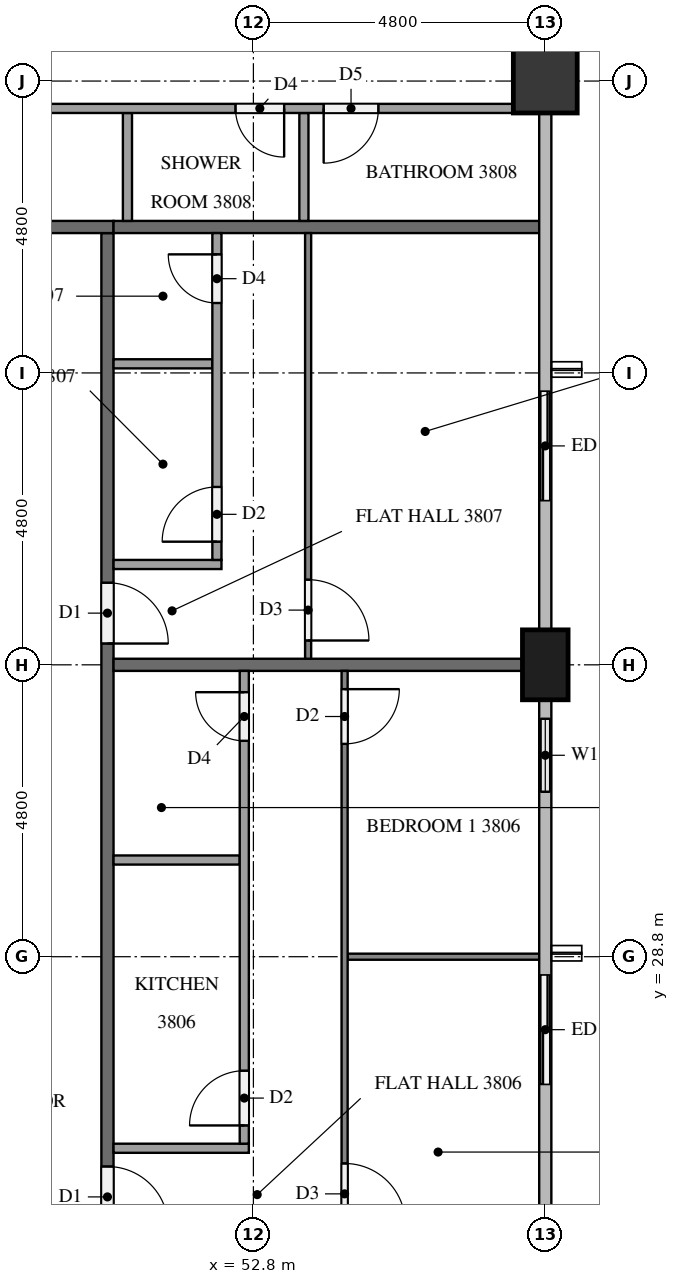
"""IFC4 building model, lengths in metres.
Left out: names, types, materials, properties, quantities, classifications, styles, units other than length and angle.
Written with IfcOpenShell. Run it as: python <this file> out.ifc"""

import sys

from ifc_helpers import new_model, si_unit, direction, frame, frame_2d, origin, origin_2d, place, context, subcontext, project, spatial, rectangle, extrude, element, fill, save


model = new_model("IFC4")
c1 = context("Model", 3, precision=1e-05, world=origin(), true_north=direction((0.0, 1.0)))
c2 = subcontext(c1, "Body", "Model", "MODEL_VIEW")
j1 = project(units=[si_unit("LENGTHUNIT", "METRE"), si_unit("PLANEANGLEUNIT", "RADIAN")], contexts=[c1])
p1 = place(None, origin())
s1 = spatial("IfcSite", under=j1, at=p1, CompositionType="ELEMENT")
p2 = place(p1, origin())
s2 = spatial("IfcBuilding", under=s1, at=p2, CompositionType="ELEMENT")
p3 = place(p2, frame((0.0, 0.0, 149.0)))
s3 = spatial("IfcBuildingStorey", under=s2, at=p3, CompositionType="ELEMENT", Elevation=149.0)
p4 = place(p3, frame((57.6, 33.6, 0.0), z_axis=(0.0, 0.0, 1.0), x_axis=(0.0, 1.0, 0.0)))
e1 = element("IfcColumn", 1, at=p4, inside=s3, PredefinedType="COLUMN", context=c2, shape_type="SweptSolid", body=[
    extrude(rectangle(XDim=1.15, YDim=0.75, at=origin_2d()), origin(), (0.0, 0.0, 1.0), 3.2),
])
p5 = place(p3, frame((57.6, 43.2, 0.0), z_axis=(0.0, 0.0, 1.0), x_axis=(1.0, 0.0, 0.0)))
e2 = element("IfcColumn", 2, at=p5, inside=s3, PredefinedType="COLUMN", context=c2, shape_type="SweptSolid", body=[
    extrude(rectangle(XDim=1.05, YDim=1.05, at=origin_2d()), origin(), (0.0, 0.0, 1.0), 3.2),
])
p6 = place(p3, frame((57.6, 26.4, 0.0), z_axis=(0.0, 0.0, 1.0), x_axis=(0.0, 1.0, 0.0)))
e3 = element("IfcWall", 3, at=p6, inside=s3, PredefinedType="SOLIDWALL", context=c2, shape_type="SweptSolid", body=[
    extrude(rectangle(XDim=2.4, YDim=0.15, at=frame_2d((1.2, 0.0))), origin(), (0.0, 0.0, 1.0), 3.2),
])
p7 = place(p6, frame((0.3, 0.0, 0.0)))
e4 = element("IfcOpeningElement", 4, at=p7, cuts=e3, PredefinedType="OPENING", context=c2, shape_type="SweptSolid", body=[
    extrude(rectangle(XDim=1.8, YDim=2.4, at=frame_2d((0.9, 1.2))), frame((0.0, 0.085, 0.0), z_axis=(0.0, -1.0, 0.0), x_axis=(1.0, 0.0, 0.0)), (0.0, 0.0, 1.0), 0.17),
])
p8 = place(p3, frame((57.6, 31.2, 0.0), z_axis=(0.0, 0.0, 1.0), x_axis=(0.0, 1.0, 0.0)))
e5 = element("IfcWall", 5, at=p8, inside=s3, PredefinedType="SOLIDWALL", context=c2, shape_type="SweptSolid", body=[
    extrude(rectangle(XDim=1.825, YDim=0.15, at=frame_2d((0.913, 0.0))), origin(), (0.0, 0.0, 1.0), 3.2),
])
p9 = place(p8, frame((0.312, 0.0, 0.9)))
e6 = element("IfcOpeningElement", 6, at=p9, cuts=e5, PredefinedType="OPENING", context=c2, shape_type="SweptSolid", body=[
    extrude(rectangle(XDim=1.2, YDim=1.4, at=frame_2d((0.6, 0.7))), frame((0.0, 0.085, 0.0), z_axis=(0.0, -1.0, 0.0), x_axis=(1.0, 0.0, 0.0)), (0.0, 0.0, 1.0), 0.17),
])
p10 = place(p3, frame((57.6, 36.0, 0.0), z_axis=(0.0, 0.0, 1.0), x_axis=(0.0, 1.0, 0.0)))
e7 = element("IfcWall", 7, at=p10, inside=s3, PredefinedType="SOLIDWALL", context=c2, shape_type="SweptSolid", body=[
    extrude(rectangle(XDim=2.4, YDim=0.15, at=frame_2d((1.2, 0.0))), origin(), (0.0, 0.0, 1.0), 3.2),
])
p11 = place(p10, frame((0.3, 0.0, 0.0)))
e8 = element("IfcOpeningElement", 8, at=p11, cuts=e7, PredefinedType="OPENING", context=c2, shape_type="SweptSolid", body=[
    extrude(rectangle(XDim=1.8, YDim=2.4, at=frame_2d((0.9, 1.2))), frame((0.0, 0.085, 0.0), z_axis=(0.0, -1.0, 0.0), x_axis=(1.0, 0.0, 0.0)), (0.0, 0.0, 1.0), 0.17),
])
p12 = place(p3, frame((50.4, 40.7, 0.0), z_axis=(0.0, 0.0, 1.0), x_axis=(0.0, -1.0, 0.0)))
e9 = element("IfcWall", 9, at=p12, inside=s3, PredefinedType="PARTITIONING", context=c2, shape_type="SweptSolid", body=[
    extrude(rectangle(XDim=28.6, YDim=0.2, at=frame_2d((14.3, 0.0))), origin(), (0.0, 0.0, 1.0), 3.2),
])
p13 = place(p12, frame((17.05, 0.0, 0.0)))
e10 = element("IfcOpeningElement", 10, at=p13, cuts=e9, PredefinedType="OPENING", context=c2, shape_type="SweptSolid", body=[
    extrude(rectangle(XDim=1.0, YDim=2.1, at=frame_2d((0.5, 1.05))), frame((0.0, 0.11, 0.0), z_axis=(0.0, -1.0, 0.0), x_axis=(1.0, 0.0, 0.0)), (0.0, 0.0, 1.0), 0.22),
])
p14 = place(p12, frame((15.35, 0.0, 0.0)))
e11 = element("IfcOpeningElement", 11, at=p14, cuts=e9, PredefinedType="OPENING", context=c2, shape_type="SweptSolid", body=[
    extrude(rectangle(XDim=1.0, YDim=2.1, at=frame_2d((0.5, 1.05))), frame((0.0, 0.11, 0.0), z_axis=(0.0, -1.0, 0.0), x_axis=(1.0, 0.0, 0.0)), (0.0, 0.0, 1.0), 0.22),
])
p15 = place(p12, frame((5.75, 0.0, 0.0)))
e12 = element("IfcOpeningElement", 12, at=p15, cuts=e9, PredefinedType="OPENING", context=c2, shape_type="SweptSolid", body=[
    extrude(rectangle(XDim=1.0, YDim=2.1, at=frame_2d((0.5, 1.05))), frame((0.0, 0.11, 0.0), z_axis=(0.0, -1.0, 0.0), x_axis=(1.0, 0.0, 0.0)), (0.0, 0.0, 1.0), 0.22),
])
p16 = place(p3, frame((11.9, 40.8, 0.0), z_axis=(0.0, 0.0, 1.0), x_axis=(1.0, 0.0, 0.0)))
e13 = element("IfcWall", 13, at=p16, inside=s3, PredefinedType="PARTITIONING", context=c2, shape_type="SweptSolid", body=[
    extrude(rectangle(XDim=38.6, YDim=0.2, at=frame_2d((19.3, 0.0))), origin(), (0.0, 0.0, 1.0), 3.2),
])
p17 = place(p16, frame((31.65, 0.0, 0.0)))
e14 = element("IfcOpeningElement", 14, at=p17, cuts=e13, PredefinedType="OPENING", context=c2, shape_type="SweptSolid", body=[
    extrude(rectangle(XDim=1.0, YDim=2.1, at=frame_2d((0.5, 1.05))), frame((0.0, 0.11, 0.0), z_axis=(0.0, -1.0, 0.0), x_axis=(1.0, 0.0, 0.0)), (0.0, 0.0, 1.0), 0.22),
])
p18 = place(p16, frame((29.95, 0.0, 0.0)))
e15 = element("IfcOpeningElement", 15, at=p18, cuts=e13, PredefinedType="OPENING", context=c2, shape_type="SweptSolid", body=[
    extrude(rectangle(XDim=1.0, YDim=2.1, at=frame_2d((0.5, 1.05))), frame((0.0, 0.11, 0.0), z_axis=(0.0, -1.0, 0.0), x_axis=(1.0, 0.0, 0.0)), (0.0, 0.0, 1.0), 0.22),
])
p19 = place(p16, frame((15.55, 0.0, 0.0)))
e16 = element("IfcOpeningElement", 16, at=p19, cuts=e13, PredefinedType="OPENING", context=c2, shape_type="SweptSolid", body=[
    extrude(rectangle(XDim=1.0, YDim=2.1, at=frame_2d((0.5, 1.05))), frame((0.0, 0.11, 0.0), z_axis=(0.0, -1.0, 0.0), x_axis=(1.0, 0.0, 0.0)), (0.0, 0.0, 1.0), 0.22),
])
p20 = place(p16, frame((1.15, 0.0, 0.0)))
e17 = element("IfcOpeningElement", 17, at=p20, cuts=e13, PredefinedType="OPENING", context=c2, shape_type="SweptSolid", body=[
    extrude(rectangle(XDim=1.0, YDim=2.1, at=frame_2d((0.5, 1.05))), frame((0.0, 0.11, 0.0), z_axis=(0.0, -1.0, 0.0), x_axis=(1.0, 0.0, 0.0)), (0.0, 0.0, 1.0), 0.22),
])
p21 = place(p3, frame((50.5, 33.6, 0.0), z_axis=(0.0, 0.0, 1.0), x_axis=(1.0, 0.0, 0.0)))
e18 = element("IfcWall", 18, at=p21, inside=s3, PredefinedType="PARTITIONING", context=c2, shape_type="SweptSolid", body=[
    extrude(rectangle(XDim=6.725, YDim=0.2, at=frame_2d((3.363, 0.0))), origin(), (0.0, 0.0, 1.0), 3.2),
])
p22 = place(p3, frame((50.5, 40.8, 0.0), z_axis=(0.0, 0.0, 1.0), x_axis=(1.0, 0.0, 0.0)))
e19 = element("IfcWall", 19, at=p22, inside=s3, PredefinedType="PARTITIONING", context=c2, shape_type="SweptSolid", body=[
    extrude(rectangle(XDim=7.0, YDim=0.2, at=frame_2d((3.5, 0.0))), origin(), (0.0, 0.0, 1.0), 3.2),
])
p23 = place(p3, frame((54.35, 28.8, 0.0), z_axis=(0.0, 0.0, 1.0), x_axis=(1.0, 0.0, 0.0)))
e20 = element("IfcWall", 20, at=p23, inside=s3, PredefinedType="PARTITIONING", context=c2, shape_type="SweptSolid", body=[
    extrude(rectangle(XDim=3.15, YDim=0.1, at=frame_2d((1.575, 0.0))), origin(), (0.0, 0.0, 1.0), 3.2),
])
p24 = place(p3, frame((54.3, 33.5, 0.0), z_axis=(0.0, 0.0, 1.0), x_axis=(0.0, -1.0, 0.0)))
e21 = element("IfcWall", 21, at=p24, inside=s3, PredefinedType="PARTITIONING", context=c2, shape_type="SweptSolid", body=[
    extrude(rectangle(XDim=9.4, YDim=0.1, at=frame_2d((4.7, 0.0))), origin(), (0.0, 0.0, 1.0), 3.2),
])
p25 = place(p24, frame((8.1, 0.0, 0.0)))
e22 = element("IfcOpeningElement", 22, at=p25, cuts=e21, PredefinedType="OPENING", context=c2, shape_type="SweptSolid", body=[
    extrude(rectangle(XDim=1.0, YDim=2.1, at=frame_2d((0.5, 1.05))), frame((0.0, 0.06, 0.0), z_axis=(0.0, -1.0, 0.0), x_axis=(1.0, 0.0, 0.0)), (0.0, 0.0, 1.0), 0.12),
])
p26 = place(p24, frame((0.3, 0.0, 0.0)))
e23 = element("IfcOpeningElement", 23, at=p26, cuts=e21, PredefinedType="OPENING", context=c2, shape_type="SweptSolid", body=[
    extrude(rectangle(XDim=0.9, YDim=2.1, at=frame_2d((0.45, 1.05))), frame((0.0, 0.06, 0.0), z_axis=(0.0, -1.0, 0.0), x_axis=(1.0, 0.0, 0.0)), (0.0, 0.0, 1.0), 0.12),
])
p27 = place(p3, frame((50.5, 30.39, 0.0), z_axis=(0.0, 0.0, 1.0), x_axis=(1.0, 0.0, 0.0)))
e24 = element("IfcWall", 24, at=p27, inside=s3, PredefinedType="PARTITIONING", context=c2, shape_type="SweptSolid", body=[
    extrude(rectangle(XDim=2.075, YDim=0.15, at=frame_2d((1.038, 0.0))), origin(), (0.0, 0.0, 1.0), 3.2),
])
p28 = place(p3, frame((50.5, 25.65, 0.0), z_axis=(0.0, 0.0, 1.0), x_axis=(1.0, 0.0, 0.0)))
e25 = element("IfcWall", 25, at=p28, inside=s3, PredefinedType="PARTITIONING", context=c2, shape_type="SweptSolid", body=[
    extrude(rectangle(XDim=2.225, YDim=0.15, at=frame_2d((1.113, 0.0))), origin(), (0.0, 0.0, 1.0), 3.2),
])
p29 = place(p3, frame((52.65, 25.725, 0.0), z_axis=(0.0, 0.0, 1.0), x_axis=(0.0, 1.0, 0.0)))
e26 = element("IfcWall", 26, at=p29, inside=s3, PredefinedType="PARTITIONING", context=c2, shape_type="SweptSolid", body=[
    extrude(rectangle(XDim=7.775, YDim=0.15, at=frame_2d((3.887, 0.0))), origin(), (0.0, 0.0, 1.0), 3.2),
])
p30 = place(p29, frame((0.3, 0.0, 0.0)))
e27 = element("IfcOpeningElement", 27, at=p30, cuts=e26, PredefinedType="OPENING", context=c2, shape_type="SweptSolid", body=[
    extrude(rectangle(XDim=0.9, YDim=2.1, at=frame_2d((0.45, 1.05))), frame((0.0, 0.085, 0.0), z_axis=(0.0, -1.0, 0.0), x_axis=(1.0, 0.0, 0.0)), (0.0, 0.0, 1.0), 0.17),
])
p31 = place(p29, frame((6.625, 0.0, 0.0)))
e28 = element("IfcOpeningElement", 28, at=p31, cuts=e26, PredefinedType="OPENING", context=c2, shape_type="SweptSolid", body=[
    extrude(rectangle(XDim=0.8, YDim=2.1, at=frame_2d((0.4, 1.05))), frame((0.0, 0.085, 0.0), z_axis=(0.0, -1.0, 0.0), x_axis=(1.0, 0.0, 0.0)), (0.0, 0.0, 1.0), 0.17),
])
p32 = place(p3, frame((53.7, 40.7, 0.0), z_axis=(0.0, 0.0, 1.0), x_axis=(0.0, -1.0, 0.0)))
e29 = element("IfcWall", 29, at=p32, inside=s3, PredefinedType="PARTITIONING", context=c2, shape_type="SweptSolid", body=[
    extrude(rectangle(XDim=7.0, YDim=0.1, at=frame_2d((3.5, 0.0))), origin(), (0.0, 0.0, 1.0), 3.2),
])
p33 = place(p32, frame((5.7, 0.0, 0.0)))
e30 = element("IfcOpeningElement", 30, at=p33, cuts=e29, PredefinedType="OPENING", context=c2, shape_type="SweptSolid", body=[
    extrude(rectangle(XDim=1.0, YDim=2.1, at=frame_2d((0.5, 1.05))), frame((0.0, 0.06, 0.0), z_axis=(0.0, -1.0, 0.0), x_axis=(1.0, 0.0, 0.0)), (0.0, 0.0, 1.0), 0.12),
])
p34 = place(p3, frame((50.5, 38.55, 0.0), z_axis=(0.0, 0.0, 1.0), x_axis=(1.0, 0.0, 0.0)))
e31 = element("IfcWall", 31, at=p34, inside=s3, PredefinedType="PARTITIONING", context=c2, shape_type="SweptSolid", body=[
    extrude(rectangle(XDim=1.625, YDim=0.15, at=frame_2d((0.812, 0.0))), origin(), (0.0, 0.0, 1.0), 3.2),
])
p35 = place(p3, frame((50.5, 35.25, 0.0), z_axis=(0.0, 0.0, 1.0), x_axis=(1.0, 0.0, 0.0)))
e32 = element("IfcWall", 32, at=p35, inside=s3, PredefinedType="PARTITIONING", context=c2, shape_type="SweptSolid", body=[
    extrude(rectangle(XDim=1.775, YDim=0.15, at=frame_2d((0.887, 0.0))), origin(), (0.0, 0.0, 1.0), 3.2),
])
p36 = place(p3, frame((52.2, 35.325, 0.0), z_axis=(0.0, 0.0, 1.0), x_axis=(0.0, 1.0, 0.0)))
e33 = element("IfcWall", 33, at=p36, inside=s3, PredefinedType="PARTITIONING", context=c2, shape_type="SweptSolid", body=[
    extrude(rectangle(XDim=5.375, YDim=0.15, at=frame_2d((2.688, 0.0))), origin(), (0.0, 0.0, 1.0), 3.2),
])
p37 = place(p36, frame((0.3, 0.0, 0.0)))
e34 = element("IfcOpeningElement", 34, at=p37, cuts=e33, PredefinedType="OPENING", context=c2, shape_type="SweptSolid", body=[
    extrude(rectangle(XDim=0.9, YDim=2.1, at=frame_2d((0.45, 1.05))), frame((0.0, 0.085, 0.0), z_axis=(0.0, -1.0, 0.0), x_axis=(1.0, 0.0, 0.0)), (0.0, 0.0, 1.0), 0.17),
])
p38 = place(p36, frame((4.225, 0.0, 0.0)))
e35 = element("IfcOpeningElement", 35, at=p38, cuts=e33, PredefinedType="OPENING", context=c2, shape_type="SweptSolid", body=[
    extrude(rectangle(XDim=0.8, YDim=2.1, at=frame_2d((0.4, 1.05))), frame((0.0, 0.085, 0.0), z_axis=(0.0, -1.0, 0.0), x_axis=(1.0, 0.0, 0.0)), (0.0, 0.0, 1.0), 0.17),
])
for number, where, z_axis, x_axis in (
    (36, (50.729, 40.9, 0.0), (0.0, 0.0, 1.0), (0.0, 1.0, 0.0)),
    (37, (53.631, 40.9, 0.0), (0.0, 0.0, 1.0), (0.0, 1.0, 0.0)),
):
    element("IfcWall", number, at=place(p3, frame(where, z_axis=z_axis, x_axis=x_axis)), inside=s3, PredefinedType="PARTITIONING", context=c2, shape_type="SweptSolid", body=[
        extrude(rectangle(XDim=1.775, YDim=0.15, at=frame_2d((0.888, 0.0))), origin(), (0.0, 0.0, 1.0), 3.2),
    ])
p39 = place(p3, frame((57.075, 42.75, 0.0), z_axis=(0.0, 0.0, 1.0), x_axis=(-1.0, 0.0, 0.0)))
e38 = element("IfcWall", 38, at=p39, inside=s3, PredefinedType="PARTITIONING", context=c2, shape_type="SweptSolid", body=[
    extrude(rectangle(XDim=12.15, YDim=0.15, at=frame_2d((6.075, 0.0))), origin(), (0.0, 0.0, 1.0), 3.2),
])
p40 = place(p39, frame((10.95, 0.0, 0.0)))
e39 = element("IfcOpeningElement", 39, at=p40, cuts=e38, PredefinedType="OPENING", context=c2, shape_type="SweptSolid", body=[
    extrude(rectangle(XDim=0.9, YDim=2.1, at=frame_2d((0.45, 1.05))), frame((0.0, 0.085, 0.0), z_axis=(0.0, -1.0, 0.0), x_axis=(1.0, 0.0, 0.0)), (0.0, 0.0, 1.0), 0.17),
])
p41 = place(p39, frame((3.769, 0.0, 0.0)))
e40 = element("IfcOpeningElement", 40, at=p41, cuts=e38, PredefinedType="OPENING", context=c2, shape_type="SweptSolid", body=[
    extrude(rectangle(XDim=0.8, YDim=2.1, at=frame_2d((0.4, 1.05))), frame((0.0, 0.085, 0.0), z_axis=(0.0, -1.0, 0.0), x_axis=(1.0, 0.0, 0.0)), (0.0, 0.0, 1.0), 0.17),
])
p42 = place(p39, frame((2.219, 0.0, 0.0)))
e41 = element("IfcOpeningElement", 41, at=p42, cuts=e38, PredefinedType="OPENING", context=c2, shape_type="SweptSolid", body=[
    extrude(rectangle(XDim=0.9, YDim=2.1, at=frame_2d((0.45, 1.05))), frame((0.0, 0.085, 0.0), z_axis=(0.0, -1.0, 0.0), x_axis=(1.0, 0.0, 0.0)), (0.0, 0.0, 1.0), 0.17),
])
p43 = place(p7, origin())
e42 = element("IfcDoor", 42, at=p43, inside=s3, OperationType="SLIDING_TO_RIGHT", PredefinedType="DOOR", context=c2, shape_type="SweptSolid", body=[
    extrude(rectangle(XDim=1.8, YDim=2.4, at=frame_2d((0.9, 1.2))), frame((0.0, 0.025, 0.0), z_axis=(0.0, -1.0, 0.0), x_axis=(1.0, 0.0, 0.0)), (0.0, 0.0, 1.0), 0.05),
])
fill(e4, e42)
p44 = place(p9, origin())
e43 = element("IfcWindow", 43, at=p44, inside=s3, PartitioningType="SINGLE_PANEL", PredefinedType="WINDOW", context=c2, shape_type="SweptSolid", body=[
    extrude(rectangle(XDim=1.2, YDim=1.4, at=frame_2d((0.6, 0.7))), frame((0.0, 0.03, 0.0), z_axis=(0.0, -1.0, 0.0), x_axis=(1.0, 0.0, 0.0)), (0.0, 0.0, 1.0), 0.06),
])
fill(e6, e43)
p45 = place(p11, origin())
e44 = element("IfcDoor", 44, at=p45, inside=s3, OperationType="SLIDING_TO_LEFT", PredefinedType="DOOR", context=c2, shape_type="SweptSolid", body=[
    extrude(rectangle(XDim=1.8, YDim=2.4, at=frame_2d((0.9, 1.2))), frame((0.0, 0.025, 0.0), z_axis=(0.0, -1.0, 0.0), x_axis=(1.0, 0.0, 0.0)), (0.0, 0.0, 1.0), 0.05),
])
fill(e8, e44)
p46 = place(p14, origin())
e45 = element("IfcDoor", 45, at=p46, inside=s3, OperationType="SINGLE_SWING_RIGHT", PredefinedType="DOOR", context=c2, shape_type="SweptSolid", body=[
    extrude(rectangle(XDim=1.0, YDim=2.1, at=frame_2d((0.5, 1.05))), frame((0.0, 0.025, 0.0), z_axis=(0.0, -1.0, 0.0), x_axis=(1.0, 0.0, 0.0)), (0.0, 0.0, 1.0), 0.05),
])
fill(e11, e45)
p47 = place(p15, origin())
e46 = element("IfcDoor", 46, at=p47, inside=s3, OperationType="SINGLE_SWING_RIGHT", PredefinedType="DOOR", context=c2, shape_type="SweptSolid", body=[
    extrude(rectangle(XDim=1.0, YDim=2.1, at=frame_2d((0.5, 1.05))), frame((0.0, 0.025, 0.0), z_axis=(0.0, -1.0, 0.0), x_axis=(1.0, 0.0, 0.0)), (0.0, 0.0, 1.0), 0.05),
])
fill(e12, e46)
p48 = place(p25, origin())
e47 = element("IfcDoor", 47, at=p48, inside=s3, OperationType="SINGLE_SWING_RIGHT", PredefinedType="DOOR", context=c2, shape_type="SweptSolid", body=[
    extrude(rectangle(XDim=1.0, YDim=2.1, at=frame_2d((0.5, 1.05))), frame((0.0, 0.025, 0.0), z_axis=(0.0, -1.0, 0.0), x_axis=(1.0, 0.0, 0.0)), (0.0, 0.0, 1.0), 0.05),
])
fill(e22, e47)
p49 = place(p26, origin())
e48 = element("IfcDoor", 48, at=p49, inside=s3, OperationType="SINGLE_SWING_LEFT", PredefinedType="DOOR", context=c2, shape_type="SweptSolid", body=[
    extrude(rectangle(XDim=0.9, YDim=2.1, at=frame_2d((0.45, 1.05))), frame((0.0, 0.025, 0.0), z_axis=(0.0, -1.0, 0.0), x_axis=(1.0, 0.0, 0.0)), (0.0, 0.0, 1.0), 0.05),
])
fill(e23, e48)
p50 = place(p30, origin())
e49 = element("IfcDoor", 49, at=p50, inside=s3, OperationType="SINGLE_SWING_LEFT", PredefinedType="DOOR", context=c2, shape_type="SweptSolid", body=[
    extrude(rectangle(XDim=0.9, YDim=2.1, at=frame_2d((0.45, 1.05))), frame((0.0, 0.025, 0.0), z_axis=(0.0, -1.0, 0.0), x_axis=(1.0, 0.0, 0.0)), (0.0, 0.0, 1.0), 0.05),
])
fill(e27, e49)
p51 = place(p31, origin())
e50 = element("IfcDoor", 50, at=p51, inside=s3, OperationType="SINGLE_SWING_RIGHT", PredefinedType="DOOR", context=c2, shape_type="SweptSolid", body=[
    extrude(rectangle(XDim=0.8, YDim=2.1, at=frame_2d((0.4, 1.05))), frame((0.0, 0.025, 0.0), z_axis=(0.0, -1.0, 0.0), x_axis=(1.0, 0.0, 0.0)), (0.0, 0.0, 1.0), 0.05),
])
fill(e28, e50)
p52 = place(p33, origin())
e51 = element("IfcDoor", 51, at=p52, inside=s3, OperationType="SINGLE_SWING_RIGHT", PredefinedType="DOOR", context=c2, shape_type="SweptSolid", body=[
    extrude(rectangle(XDim=1.0, YDim=2.1, at=frame_2d((0.5, 1.05))), frame((0.0, 0.025, 0.0), z_axis=(0.0, -1.0, 0.0), x_axis=(1.0, 0.0, 0.0)), (0.0, 0.0, 1.0), 0.05),
])
fill(e30, e51)
p53 = place(p37, origin())
e52 = element("IfcDoor", 52, at=p53, inside=s3, OperationType="SINGLE_SWING_LEFT", PredefinedType="DOOR", context=c2, shape_type="SweptSolid", body=[
    extrude(rectangle(XDim=0.9, YDim=2.1, at=frame_2d((0.45, 1.05))), frame((0.0, 0.025, 0.0), z_axis=(0.0, -1.0, 0.0), x_axis=(1.0, 0.0, 0.0)), (0.0, 0.0, 1.0), 0.05),
])
fill(e34, e52)
p54 = place(p38, origin())
e53 = element("IfcDoor", 53, at=p54, inside=s3, OperationType="SINGLE_SWING_RIGHT", PredefinedType="DOOR", context=c2, shape_type="SweptSolid", body=[
    extrude(rectangle(XDim=0.8, YDim=2.1, at=frame_2d((0.4, 1.05))), frame((0.0, 0.025, 0.0), z_axis=(0.0, -1.0, 0.0), x_axis=(1.0, 0.0, 0.0)), (0.0, 0.0, 1.0), 0.05),
])
fill(e35, e53)
p55 = place(p41, origin())
e54 = element("IfcDoor", 54, at=p55, inside=s3, OperationType="SINGLE_SWING_LEFT", PredefinedType="DOOR", context=c2, shape_type="SweptSolid", body=[
    extrude(rectangle(XDim=0.8, YDim=2.1, at=frame_2d((0.4, 1.05))), frame((0.0, 0.025, 0.0), z_axis=(0.0, -1.0, 0.0), x_axis=(1.0, 0.0, 0.0)), (0.0, 0.0, 1.0), 0.05),
])
fill(e40, e54)
p56 = place(p42, origin())
e55 = element("IfcDoor", 55, at=p56, inside=s3, OperationType="SINGLE_SWING_RIGHT", PredefinedType="DOOR", context=c2, shape_type="SweptSolid", body=[
    extrude(rectangle(XDim=0.9, YDim=2.1, at=frame_2d((0.45, 1.05))), frame((0.0, 0.025, 0.0), z_axis=(0.0, -1.0, 0.0), x_axis=(1.0, 0.0, 0.0)), (0.0, 0.0, 1.0), 0.05),
])
fill(e41, e55)
save(model, sys.argv[1])
